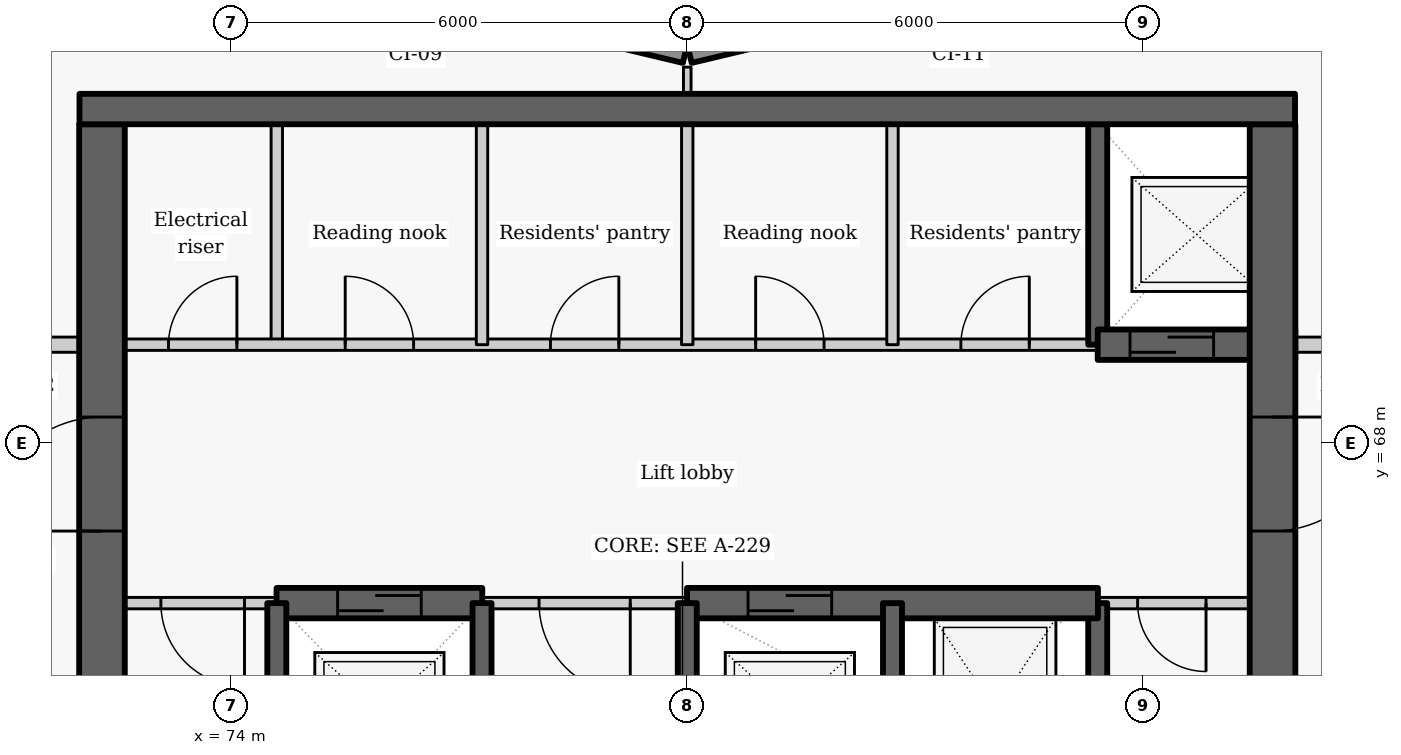
"""IFC4 building model, lengths in metres.
Left out: names, types, materials, properties, quantities, classifications, styles, units other than length and angle.
Written with IfcOpenShell. Run it as: python <this file> out.ifc"""

import sys

from ifc_helpers import new_model, si_unit, direction, frame, frame_2d, origin, place, context, subcontext, project, spatial, rectangle, extrude, element, fill, save


model = new_model("IFC4")
c1 = context("Model", 3, precision=1e-05, world=origin(), true_north=direction((0.0, 1.0)))
c2 = subcontext(c1, "Body", "Model", "MODEL_VIEW")
j1 = project(units=[si_unit("LENGTHUNIT", "METRE"), si_unit("PLANEANGLEUNIT", "RADIAN")], contexts=[c1])
p1 = place(None, origin())
s1 = spatial("IfcSite", under=j1, at=p1, CompositionType="ELEMENT")
p2 = place(p1, origin())
s2 = spatial("IfcBuilding", under=s1, at=p2, CompositionType="ELEMENT")
p3 = place(p2, frame((0.0, 0.0, 166.8)))
s3 = spatial("IfcBuildingStorey", under=s2, at=p3, CompositionType="ELEMENT", Elevation=166.8)
p4 = place(p3, frame((83.186, 73.881, 0.0), z_axis=(0.0, 0.0, 1.0), x_axis=(-0.972773113459, -0.231759508395, 0.0)))
e1 = element("IfcWall", 1, at=p4, inside=s3, PredefinedType="SOLIDWALL", context=c2, shape_type="SweptSolid", body=[
    extrude(rectangle(XDim=3.246, YDim=0.25, at=frame_2d((1.623, 0.0))), origin(), (0.0, 0.0, 1.0), 2.05),
])
p5 = place(p4, frame((0.573, 0.0, 0.9)))
e2 = element("IfcOpeningElement", 2, at=p5, cuts=e1, PredefinedType="OPENING", context=c2, shape_type="SweptSolid", body=[
    extrude(rectangle(XDim=2.1, YDim=1.1, at=frame_2d((1.05, 0.55))), frame((0.0, 0.135, 0.0), z_axis=(0.0, -1.0, 0.0), x_axis=(1.0, 0.0, 0.0)), (0.0, 0.0, 1.0), 0.27),
])
p6 = place(p3, frame((79.971, 73.128, 0.0), z_axis=(0.0, 0.0, 1.0), x_axis=(-0.972773113459, 0.231759508395, 0.0)))
e3 = element("IfcWall", 3, at=p6, inside=s3, PredefinedType="SOLIDWALL", context=c2, shape_type="SweptSolid", body=[
    extrude(rectangle(XDim=3.246, YDim=0.25, at=frame_2d((1.623, 0.0))), origin(), (0.0, 0.0, 1.0), 2.05),
])
p7 = place(p6, frame((0.573, 0.0, 0.9)))
e4 = element("IfcOpeningElement", 4, at=p7, cuts=e3, PredefinedType="OPENING", context=c2, shape_type="SweptSolid", body=[
    extrude(rectangle(XDim=2.1, YDim=1.1, at=frame_2d((1.05, 0.55))), frame((0.0, 0.135, 0.0), z_axis=(0.0, -1.0, 0.0), x_axis=(1.0, 0.0, 0.0)), (0.0, 0.0, 1.0), 0.27),
])
p8 = place(p3, frame((74.6, 69.3, 0.0), z_axis=(0.0, 0.0, 1.0), x_axis=(0.0, 1.0, 0.0)))
e5 = element("IfcWall", 5, at=p8, inside=s3, PredefinedType="PARTITIONING", context=c2, shape_type="SweptSolid", body=[
    extrude(rectangle(XDim=2.9, YDim=0.15, at=frame_2d((1.45, 0.0))), origin(), (0.0, 0.0, 1.0), 2.95),
])
p9 = place(p3, frame((72.0, 69.3, 0.0), z_axis=(0.0, 0.0, 1.0), x_axis=(1.0, 0.0, 0.0)))
e6 = element("IfcWall", 6, at=p9, inside=s3, PredefinedType="PARTITIONING", context=c2, shape_type="SweptSolid", body=[
    extrude(rectangle(XDim=13.4, YDim=0.15, at=frame_2d((6.7, 0.0))), origin(), (0.0, 0.0, 1.0), 2.95),
])
p10 = place(p9, frame((1.175, 0.0, 0.0)))
e7 = element("IfcOpeningElement", 7, at=p10, cuts=e6, PredefinedType="OPENING", context=c2, shape_type="SweptSolid", body=[
    extrude(rectangle(XDim=0.9, YDim=2.1, at=frame_2d((0.45, 1.05))), frame((0.0, 0.085, 0.0), z_axis=(0.0, -1.0, 0.0), x_axis=(1.0, 0.0, 0.0)), (0.0, 0.0, 1.0), 0.17),
])
p11 = place(p9, frame((3.5, 0.0, 0.0)))
e8 = element("IfcOpeningElement", 8, at=p11, cuts=e6, PredefinedType="OPENING", context=c2, shape_type="SweptSolid", body=[
    extrude(rectangle(XDim=0.9, YDim=2.1, at=frame_2d((0.45, 1.05))), frame((0.0, 0.085, 0.0), z_axis=(0.0, -1.0, 0.0), x_axis=(1.0, 0.0, 0.0)), (0.0, 0.0, 1.0), 0.17),
])
p12 = place(p9, frame((6.2, 0.0, 0.0)))
e9 = element("IfcOpeningElement", 9, at=p12, cuts=e6, PredefinedType="OPENING", context=c2, shape_type="SweptSolid", body=[
    extrude(rectangle(XDim=0.9, YDim=2.1, at=frame_2d((0.45, 1.05))), frame((0.0, 0.085, 0.0), z_axis=(0.0, -1.0, 0.0), x_axis=(1.0, 0.0, 0.0)), (0.0, 0.0, 1.0), 0.17),
])
p13 = place(p9, frame((8.9, 0.0, 0.0)))
e10 = element("IfcOpeningElement", 10, at=p13, cuts=e6, PredefinedType="OPENING", context=c2, shape_type="SweptSolid", body=[
    extrude(rectangle(XDim=0.9, YDim=2.1, at=frame_2d((0.45, 1.05))), frame((0.0, 0.085, 0.0), z_axis=(0.0, -1.0, 0.0), x_axis=(1.0, 0.0, 0.0)), (0.0, 0.0, 1.0), 0.17),
])
p14 = place(p9, frame((11.6, 0.0, 0.0)))
e11 = element("IfcOpeningElement", 11, at=p14, cuts=e6, PredefinedType="OPENING", context=c2, shape_type="SweptSolid", body=[
    extrude(rectangle(XDim=0.9, YDim=2.1, at=frame_2d((0.45, 1.05))), frame((0.0, 0.085, 0.0), z_axis=(0.0, -1.0, 0.0), x_axis=(1.0, 0.0, 0.0)), (0.0, 0.0, 1.0), 0.17),
])
p15 = place(p3, frame((72.3, 63.1, -0.275), z_axis=(0.0, 0.0, 1.0), x_axis=(0.0, 1.0, 0.0)))
e12 = element("IfcWall", 12, at=p15, inside=s3, PredefinedType="SHEAR", context=c2, shape_type="SweptSolid", body=[
    extrude(rectangle(XDim=9.1, YDim=0.6, at=frame_2d((4.55, 0.0))), origin(), (0.0, 0.0, 1.0), 3.225),
])
p16 = place(p15, frame((3.748, 0.0, 0.275)))
e13 = element("IfcOpeningElement", 13, at=p16, cuts=e12, PredefinedType="OPENING", context=c2, shape_type="SweptSolid", body=[
    extrude(rectangle(XDim=1.5, YDim=2.1, at=frame_2d((0.75, 1.05))), frame((0.0, 0.31, 0.0), z_axis=(0.0, -1.0, 0.0), x_axis=(1.0, 0.0, 0.0)), (0.0, 0.0, 1.0), 0.62),
])
p17 = place(p3, frame((85.4, 63.1, -0.275), z_axis=(0.0, 0.0, 1.0), x_axis=(0.0, 1.0, 0.0)))
e14 = element("IfcWall", 14, at=p17, inside=s3, PredefinedType="SHEAR", context=c2, shape_type="SweptSolid", body=[
    extrude(rectangle(XDim=2.8, YDim=0.25, at=frame_2d((1.4, 0.0))), origin(), (0.0, 0.0, 1.0), 3.225),
])
p18 = place(p3, frame((85.4, 69.3, -0.275), z_axis=(0.0, 0.0, 1.0), x_axis=(0.0, 1.0, 0.0)))
e15 = element("IfcWall", 15, at=p18, inside=s3, PredefinedType="SHEAR", context=c2, shape_type="SweptSolid", body=[
    extrude(rectangle(XDim=2.9, YDim=0.25, at=frame_2d((1.45, 0.0))), origin(), (0.0, 0.0, 1.0), 3.225),
])
p19 = place(p3, frame((85.4, 69.3, -0.275), z_axis=(0.0, 0.0, 1.0), x_axis=(1.0, 0.0, 0.0)))
e16 = element("IfcWall", 16, at=p19, inside=s3, PredefinedType="SHEAR", context=c2, shape_type="SweptSolid", body=[
    extrude(rectangle(XDim=2.6, YDim=0.4, at=frame_2d((1.3, 0.0))), origin(), (0.0, 0.0, 1.0), 3.225),
])
p20 = place(p19, frame((0.425, 0.0, 0.275)))
e17 = element("IfcOpeningElement", 17, at=p20, cuts=e16, PredefinedType="OPENING", context=c2, shape_type="SweptSolid", body=[
    extrude(rectangle(XDim=1.1, YDim=2.1, at=frame_2d((0.55, 1.05))), frame((0.0, 0.21, 0.0), z_axis=(0.0, -1.0, 0.0), x_axis=(1.0, 0.0, 0.0)), (0.0, 0.0, 1.0), 0.42),
])
p21 = place(p3, frame((87.7, 72.2, -0.275), z_axis=(0.0, 0.0, 1.0), x_axis=(0.0, -1.0, 0.0)))
e18 = element("IfcWall", 18, at=p21, inside=s3, PredefinedType="SHEAR", context=c2, shape_type="SweptSolid", body=[
    extrude(rectangle(XDim=15.6, YDim=0.6, at=frame_2d((7.8, 0.0))), origin(), (0.0, 0.0, 1.0), 3.225),
])
p22 = place(p21, frame((3.852, 0.0, 0.275)))
e19 = element("IfcOpeningElement", 19, at=p22, cuts=e18, PredefinedType="OPENING", context=c2, shape_type="SweptSolid", body=[
    extrude(rectangle(XDim=1.5, YDim=2.1, at=frame_2d((0.75, 1.05))), frame((0.0, 0.31, 0.0), z_axis=(0.0, -1.0, 0.0), x_axis=(1.0, 0.0, 0.0)), (0.0, 0.0, 1.0), 0.62),
])
for number, where, z_axis, x_axis in (
    (20, (77.3, 69.3, 0.0), (0.0, 0.0, 1.0), (0.0, 1.0, 0.0)),
    (21, (80.0, 69.3, 0.0), (0.0, 0.0, 1.0), (0.0, 1.0, 0.0)),
    (22, (82.7, 69.3, 0.0), (0.0, 0.0, 1.0), (0.0, 1.0, 0.0)),
):
    element("IfcWall", number, at=place(p3, frame(where, z_axis=z_axis, x_axis=x_axis)), inside=s3, PredefinedType="PARTITIONING", context=c2, shape_type="SweptSolid", body=[
        extrude(rectangle(XDim=2.9, YDim=0.15, at=frame_2d((1.45, 0.0))), origin(), (0.0, 0.0, 1.0), 2.95),
    ])
p23 = place(p3, frame((74.603, 65.9, 0.0), z_axis=(0.0, 0.0, 1.0), x_axis=(-1.0, 0.0, 0.0)))
e23 = element("IfcWall", 23, at=p23, inside=s3, PredefinedType="PARTITIONING", context=c2, shape_type="SweptSolid", body=[
    extrude(rectangle(XDim=2.603, YDim=0.15, at=frame_2d((1.302, 0.0))), origin(), (0.0, 0.0, 1.0), 2.95),
])
p24 = place(p23, frame((0.428, 0.0, 0.0)))
e24 = element("IfcOpeningElement", 24, at=p24, cuts=e23, PredefinedType="OPENING", context=c2, shape_type="SweptSolid", body=[
    extrude(rectangle(XDim=1.1, YDim=2.1, at=frame_2d((0.55, 1.05))), frame((0.0, 0.085, 0.0), z_axis=(0.0, -1.0, 0.0), x_axis=(1.0, 0.0, 0.0)), (0.0, 0.0, 1.0), 0.17),
])
p25 = place(p3, frame((80.003, 65.9, 0.0), z_axis=(0.0, 0.0, 1.0), x_axis=(-1.0, 0.0, 0.0)))
e25 = element("IfcWall", 25, at=p25, inside=s3, PredefinedType="PARTITIONING", context=c2, shape_type="SweptSolid", body=[
    extrude(rectangle(XDim=2.706, YDim=0.15, at=frame_2d((1.353, 0.0))), origin(), (0.0, 0.0, 1.0), 2.95),
])
p26 = place(p25, frame((0.753, 0.0, 0.0)))
e26 = element("IfcOpeningElement", 26, at=p26, cuts=e25, PredefinedType="OPENING", context=c2, shape_type="SweptSolid", body=[
    extrude(rectangle(XDim=1.2, YDim=2.1, at=frame_2d((0.6, 1.05))), frame((0.0, 0.085, 0.0), z_axis=(0.0, -1.0, 0.0), x_axis=(1.0, 0.0, 0.0)), (0.0, 0.0, 1.0), 0.17),
])
p27 = place(p3, frame((88.0, 65.9, 0.0), z_axis=(0.0, 0.0, 1.0), x_axis=(-1.0, 0.0, 0.0)))
e27 = element("IfcWall", 27, at=p27, inside=s3, PredefinedType="PARTITIONING", context=c2, shape_type="SweptSolid", body=[
    extrude(rectangle(XDim=2.603, YDim=0.15, at=frame_2d((1.302, 0.0))), origin(), (0.0, 0.0, 1.0), 2.95),
])
p28 = place(p27, frame((1.175, 0.0, 0.0)))
e28 = element("IfcOpeningElement", 28, at=p28, cuts=e27, PredefinedType="OPENING", context=c2, shape_type="SweptSolid", body=[
    extrude(rectangle(XDim=0.9, YDim=2.1, at=frame_2d((0.45, 1.05))), frame((0.0, 0.085, 0.0), z_axis=(0.0, -1.0, 0.0), x_axis=(1.0, 0.0, 0.0)), (0.0, 0.0, 1.0), 0.17),
])
p29 = place(p3, frame((74.597, 65.9, -0.275), z_axis=(0.0, 0.0, 1.0), x_axis=(1.0, 0.0, 0.0)))
e29 = element("IfcWall", 29, at=p29, inside=s3, PredefinedType="SHEAR", context=c2, shape_type="SweptSolid", body=[
    extrude(rectangle(XDim=2.706, YDim=0.4, at=frame_2d((1.353, 0.0))), origin(), (0.0, 0.0, 1.0), 3.225),
])
p30 = place(p29, frame((0.803, 0.0, 0.275)))
e30 = element("IfcOpeningElement", 30, at=p30, cuts=e29, PredefinedType="OPENING", context=c2, shape_type="SweptSolid", body=[
    extrude(rectangle(XDim=1.1, YDim=2.1, at=frame_2d((0.55, 1.05))), frame((0.0, 0.21, 0.0), z_axis=(0.0, -1.0, 0.0), x_axis=(1.0, 0.0, 0.0)), (0.0, 0.0, 1.0), 0.42),
])
p31 = place(p3, frame((79.997, 65.9, -0.275), z_axis=(0.0, 0.0, 1.0), x_axis=(1.0, 0.0, 0.0)))
e31 = element("IfcWall", 31, at=p31, inside=s3, PredefinedType="SHEAR", context=c2, shape_type="SweptSolid", body=[
    extrude(rectangle(XDim=5.406, YDim=0.4, at=frame_2d((2.703, 0.0))), origin(), (0.0, 0.0, 1.0), 3.225),
])
p32 = place(p31, frame((0.803, 0.0, 0.275)))
e32 = element("IfcOpeningElement", 32, at=p32, cuts=e31, PredefinedType="OPENING", context=c2, shape_type="SweptSolid", body=[
    extrude(rectangle(XDim=1.1, YDim=2.1, at=frame_2d((0.55, 1.05))), frame((0.0, 0.21, 0.0), z_axis=(0.0, -1.0, 0.0), x_axis=(1.0, 0.0, 0.0)), (0.0, 0.0, 1.0), 0.42),
])
for number, where, z_axis, x_axis in (
    (33, (74.6, 63.1, -0.275), (0.0, 0.0, 1.0), (0.0, 1.0, 0.0)),
    (34, (77.3, 63.1, -0.275), (0.0, 0.0, 1.0), (0.0, 1.0, 0.0)),
    (35, (80.0, 63.1, -0.275), (0.0, 0.0, 1.0), (0.0, 1.0, 0.0)),
    (36, (82.7, 63.1, -0.275), (0.0, 0.0, 1.0), (0.0, 1.0, 0.0)),
):
    element("IfcWall", number, at=place(p3, frame(where, z_axis=z_axis, x_axis=x_axis)), inside=s3, PredefinedType="SHEAR", context=c2, shape_type="SweptSolid", body=[
        extrude(rectangle(XDim=2.8, YDim=0.25, at=frame_2d((1.4, 0.0))), origin(), (0.0, 0.0, 1.0), 3.225),
    ])
for number, where, z_axis, x_axis in (
    (37, (70.45, 69.3, 0.0), (0.0, 0.0, 1.0), (1.0, 0.0, 0.0)),
    (38, (88.0, 69.3, 0.0), (0.0, 0.0, 1.0), (1.0, 0.0, 0.0)),
):
    element("IfcWall", number, at=place(p3, frame(where, z_axis=z_axis, x_axis=x_axis)), inside=s3, PredefinedType="PARTITIONING", context=c2, shape_type="SweptSolid", body=[
        extrude(rectangle(XDim=1.55, YDim=0.2, at=frame_2d((0.775, 0.0))), origin(), (0.0, 0.0, 1.0), 2.95),
    ])
p33 = place(p3, frame((80.0, 72.6, 0.0), z_axis=(0.0, 0.0, 1.0), x_axis=(0.0, 1.0, 0.0)))
e39 = element("IfcWall", 39, at=p33, inside=s3, PredefinedType="PARTITIONING", context=c2, shape_type="SweptSolid", body=[
    extrude(rectangle(XDim=0.352, YDim=0.1, at=frame_2d((0.176, 0.0))), origin(), (0.0, 0.0, 1.0), 2.95),
])
p34 = place(p3, frame((72.004, 72.4, -0.275), z_axis=(0.0, 0.0, 1.0), x_axis=(1.0, 0.0, 0.0)))
e40 = element("IfcWall", 40, at=p34, inside=s3, PredefinedType="SHEAR", context=c2, shape_type="SweptSolid", body=[
    extrude(rectangle(XDim=15.992, YDim=0.4, at=frame_2d((7.996, 0.0))), origin(), (0.0, 0.0, 1.0), 3.225),
])
p35 = place(p10, origin())
e41 = element("IfcDoor", 41, at=p35, inside=s3, OperationType="SINGLE_SWING_RIGHT", PredefinedType="DOOR", context=c2, shape_type="SweptSolid", body=[
    extrude(rectangle(XDim=0.9, YDim=2.1, at=frame_2d((0.45, 1.05))), frame((0.0, 0.025, 0.0), z_axis=(0.0, -1.0, 0.0), x_axis=(1.0, 0.0, 0.0)), (0.0, 0.0, 1.0), 0.05),
])
fill(e7, e41)
p36 = place(p20, origin())
e42 = element("IfcDoor", 42, at=p36, inside=s3, OperationType="SLIDING_TO_LEFT", PredefinedType="DOOR", context=c2, shape_type="SweptSolid", body=[
    extrude(rectangle(XDim=1.1, YDim=2.1, at=frame_2d((0.55, 1.05))), frame((0.0, 0.025, 0.0), z_axis=(0.0, -1.0, 0.0), x_axis=(1.0, 0.0, 0.0)), (0.0, 0.0, 1.0), 0.05),
])
fill(e17, e42)
p37 = place(p11, origin())
e43 = element("IfcDoor", 43, at=p37, inside=s3, OperationType="SINGLE_SWING_LEFT", PredefinedType="DOOR", context=c2, shape_type="SweptSolid", body=[
    extrude(rectangle(XDim=0.9, YDim=2.1, at=frame_2d((0.45, 1.05))), frame((0.0, 0.025, 0.0), z_axis=(0.0, -1.0, 0.0), x_axis=(1.0, 0.0, 0.0)), (0.0, 0.0, 1.0), 0.05),
])
fill(e8, e43)
p38 = place(p12, origin())
e44 = element("IfcDoor", 44, at=p38, inside=s3, OperationType="SINGLE_SWING_RIGHT", PredefinedType="DOOR", context=c2, shape_type="SweptSolid", body=[
    extrude(rectangle(XDim=0.9, YDim=2.1, at=frame_2d((0.45, 1.05))), frame((0.0, 0.025, 0.0), z_axis=(0.0, -1.0, 0.0), x_axis=(1.0, 0.0, 0.0)), (0.0, 0.0, 1.0), 0.05),
])
fill(e9, e44)
p39 = place(p13, origin())
e45 = element("IfcDoor", 45, at=p39, inside=s3, OperationType="SINGLE_SWING_LEFT", PredefinedType="DOOR", context=c2, shape_type="SweptSolid", body=[
    extrude(rectangle(XDim=0.9, YDim=2.1, at=frame_2d((0.45, 1.05))), frame((0.0, 0.025, 0.0), z_axis=(0.0, -1.0, 0.0), x_axis=(1.0, 0.0, 0.0)), (0.0, 0.0, 1.0), 0.05),
])
fill(e10, e45)
p40 = place(p14, origin())
e46 = element("IfcDoor", 46, at=p40, inside=s3, OperationType="SINGLE_SWING_RIGHT", PredefinedType="DOOR", context=c2, shape_type="SweptSolid", body=[
    extrude(rectangle(XDim=0.9, YDim=2.1, at=frame_2d((0.45, 1.05))), frame((0.0, 0.025, 0.0), z_axis=(0.0, -1.0, 0.0), x_axis=(1.0, 0.0, 0.0)), (0.0, 0.0, 1.0), 0.05),
])
fill(e11, e46)
p41 = place(p24, origin())
e47 = element("IfcDoor", 47, at=p41, inside=s3, OperationType="SINGLE_SWING_LEFT", PredefinedType="DOOR", context=c2, shape_type="SweptSolid", body=[
    extrude(rectangle(XDim=1.1, YDim=2.1, at=frame_2d((0.55, 1.05))), frame((0.0, 0.025, 0.0), z_axis=(0.0, -1.0, 0.0), x_axis=(1.0, 0.0, 0.0)), (0.0, 0.0, 1.0), 0.05),
])
fill(e24, e47)
p42 = place(p30, origin())
e48 = element("IfcDoor", 48, at=p42, inside=s3, OperationType="SLIDING_TO_LEFT", PredefinedType="DOOR", context=c2, shape_type="SweptSolid", body=[
    extrude(rectangle(XDim=1.1, YDim=2.1, at=frame_2d((0.55, 1.05))), frame((0.0, 0.025, 0.0), z_axis=(0.0, -1.0, 0.0), x_axis=(1.0, 0.0, 0.0)), (0.0, 0.0, 1.0), 0.05),
])
fill(e30, e48)
p43 = place(p26, origin())
e49 = element("IfcDoor", 49, at=p43, inside=s3, OperationType="DOUBLE_DOOR_SINGLE_SWING", PredefinedType="DOOR", context=c2, shape_type="SweptSolid", body=[
    extrude(rectangle(XDim=1.2, YDim=2.1, at=frame_2d((0.6, 1.05))), frame((0.0, 0.025, 0.0), z_axis=(0.0, -1.0, 0.0), x_axis=(1.0, 0.0, 0.0)), (0.0, 0.0, 1.0), 0.05),
])
fill(e26, e49)
p44 = place(p32, origin())
e50 = element("IfcDoor", 50, at=p44, inside=s3, OperationType="SLIDING_TO_LEFT", PredefinedType="DOOR", context=c2, shape_type="SweptSolid", body=[
    extrude(rectangle(XDim=1.1, YDim=2.1, at=frame_2d((0.55, 1.05))), frame((0.0, 0.025, 0.0), z_axis=(0.0, -1.0, 0.0), x_axis=(1.0, 0.0, 0.0)), (0.0, 0.0, 1.0), 0.05),
])
fill(e32, e50)
p45 = place(p28, origin())
e51 = element("IfcDoor", 51, at=p45, inside=s3, OperationType="SINGLE_SWING_LEFT", PredefinedType="DOOR", context=c2, shape_type="SweptSolid", body=[
    extrude(rectangle(XDim=0.9, YDim=2.1, at=frame_2d((0.45, 1.05))), frame((0.0, 0.025, 0.0), z_axis=(0.0, -1.0, 0.0), x_axis=(1.0, 0.0, 0.0)), (0.0, 0.0, 1.0), 0.05),
])
fill(e28, e51)
p46 = place(p22, origin())
e52 = element("IfcDoor", 52, at=p46, inside=s3, OperationType="DOUBLE_DOOR_SINGLE_SWING", PredefinedType="DOOR", context=c2, shape_type="SweptSolid", body=[
    extrude(rectangle(XDim=1.5, YDim=2.1, at=frame_2d((0.75, 1.05))), frame((0.0, 0.025, 0.0), z_axis=(0.0, -1.0, 0.0), x_axis=(1.0, 0.0, 0.0)), (0.0, 0.0, 1.0), 0.05),
])
fill(e19, e52)
p47 = place(p16, origin())
e53 = element("IfcDoor", 53, at=p47, inside=s3, OperationType="DOUBLE_DOOR_SINGLE_SWING", PredefinedType="DOOR", context=c2, shape_type="SweptSolid", body=[
    extrude(rectangle(XDim=1.5, YDim=2.1, at=frame_2d((0.75, 1.05))), frame((0.0, 0.025, 0.0), z_axis=(0.0, -1.0, 0.0), x_axis=(1.0, 0.0, 0.0)), (0.0, 0.0, 1.0), 0.05),
])
fill(e13, e53)
save(model, sys.argv[1])
